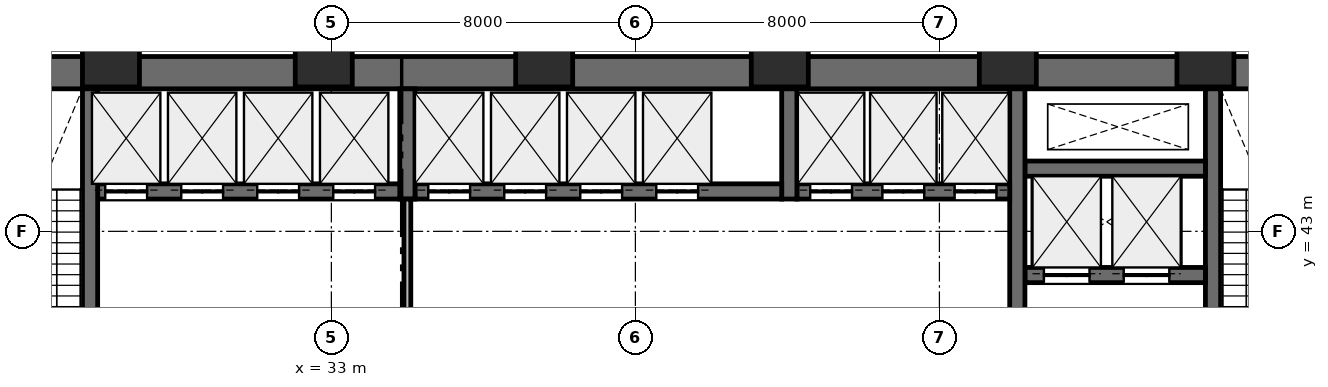
"""IFC4 building model, lengths in metres.
Left out: names, types, materials, properties, quantities, classifications, styles, units other than length and angle.
Written with IfcOpenShell. Run it as: python <this file> out.ifc"""

import sys

from ifc_helpers import new_model, si_unit, direction, frame, frame_2d, origin, origin_2d, place, context, subcontext, project, spatial, rectangle, extrude, element, fill, save


model = new_model("IFC4")
c1 = context("Model", 3, precision=1e-05, world=origin(), true_north=direction((0.0, 1.0)))
c2 = subcontext(c1, "Body", "Model", "MODEL_VIEW")
j1 = project(units=[si_unit("LENGTHUNIT", "METRE"), si_unit("PLANEANGLEUNIT", "RADIAN")], contexts=[c1])
p1 = place(None, origin())
s1 = spatial("IfcSite", under=j1, at=p1, CompositionType="ELEMENT")
p2 = place(p1, origin())
s2 = spatial("IfcBuilding", under=s1, at=p2, CompositionType="ELEMENT")
p3 = place(p2, origin())
s3 = spatial("IfcBuildingStorey", under=s2, at=p3, CompositionType="ELEMENT", Elevation=0.0)
p4 = place(p3, frame((22.9, 47.175, 0.0), z_axis=(0.0, 0.0, 1.0), x_axis=(1.0, 0.0, 0.0)))
e1 = element("IfcWall", 1, at=p4, inside=s3, PredefinedType="SHEAR", context=c2, shape_type="SweptSolid", body=[
    extrude(rectangle(XDim=43.8, YDim=0.85, at=frame_2d((21.9, 0.0))), origin(), (0.0, 0.0, 1.0), 5.4),
])
p5 = place(p3, frame((56.2, 38.425, 0.0), z_axis=(0.0, 0.0, 1.0), x_axis=(0.0, 1.0, 0.0)))
e2 = element("IfcWall", 2, at=p5, inside=s3, PredefinedType="SHEAR", context=c2, shape_type="SweptSolid", body=[
    extrude(rectangle(XDim=8.325, YDim=0.4, at=frame_2d((4.163, 0.0))), origin(), (0.0, 0.0, 1.0), 5.4),
])
p6 = place(p5, frame((0.255, 0.0, 0.0)))
e3 = element("IfcOpeningElement", 3, at=p6, cuts=e2, PredefinedType="OPENING", context=c2, shape_type="SweptSolid", body=[
    extrude(rectangle(XDim=0.9, YDim=2.15, at=frame_2d((0.45, 1.075))), frame((0.0, 0.21, 0.0), z_axis=(0.0, -1.0, 0.0), x_axis=(1.0, 0.0, 0.0)), (0.0, 0.0, 1.0), 0.42),
])
p7 = place(p3, frame((51.25, 41.85, 0.0), z_axis=(0.0, 0.0, 1.0), x_axis=(1.0, 0.0, 0.0)))
e4 = element("IfcWall", 4, at=p7, inside=s3, PredefinedType="SHEAR", context=c2, shape_type="SweptSolid", body=[
    extrude(rectangle(XDim=4.75, YDim=0.4, at=frame_2d((2.375, 0.0))), origin(), (0.0, 0.0, 1.0), 5.4),
])
p8 = place(p7, frame((0.5, 0.0, 0.0)))
e5 = element("IfcOpeningElement", 5, at=p8, cuts=e4, PredefinedType="OPENING", context=c2, shape_type="SweptSolid", body=[
    extrude(rectangle(XDim=1.2, YDim=2.2, at=frame_2d((0.6, 1.1))), frame((0.0, 0.21, 0.0), z_axis=(0.0, -1.0, 0.0), x_axis=(1.0, 0.0, 0.0)), (0.0, 0.0, 1.0), 0.42),
])
p9 = place(p7, frame((2.6, 0.0, 0.0)))
e6 = element("IfcOpeningElement", 6, at=p9, cuts=e4, PredefinedType="OPENING", context=c2, shape_type="SweptSolid", body=[
    extrude(rectangle(XDim=1.2, YDim=2.2, at=frame_2d((0.6, 1.1))), frame((0.0, 0.21, 0.0), z_axis=(0.0, -1.0, 0.0), x_axis=(1.0, 0.0, 0.0)), (0.0, 0.0, 1.0), 0.42),
])
p10 = place(p3, frame((51.25, 44.65, 0.0), z_axis=(0.0, 0.0, 1.0), x_axis=(1.0, 0.0, 0.0)))
e7 = element("IfcWall", 7, at=p10, inside=s3, PredefinedType="SHEAR", context=c2, shape_type="SweptSolid", body=[
    extrude(rectangle(XDim=4.75, YDim=0.4, at=frame_2d((2.375, 0.0))), origin(), (0.0, 0.0, 1.0), 5.4),
])
p11 = place(p3, frame((51.05, 38.425, 0.0), z_axis=(0.0, 0.0, 1.0), x_axis=(0.0, 1.0, 0.0)))
e8 = element("IfcWall", 8, at=p11, inside=s3, PredefinedType="SHEAR", context=c2, shape_type="SweptSolid", body=[
    extrude(rectangle(XDim=8.325, YDim=0.4, at=frame_2d((4.163, 0.0))), origin(), (0.0, 0.0, 1.0), 5.4),
])
p12 = place(p3, frame((45.25, 44.05, 0.0), z_axis=(0.0, 0.0, 1.0), x_axis=(1.0, 0.0, 0.0)))
e9 = element("IfcWall", 9, at=p12, inside=s3, PredefinedType="SHEAR", context=c2, shape_type="SweptSolid", body=[
    extrude(rectangle(XDim=5.6, YDim=0.4, at=frame_2d((2.8, 0.0))), origin(), (0.0, 0.0, 1.0), 5.4),
])
p13 = place(p12, frame((0.35, 0.0, 0.0)))
e10 = element("IfcOpeningElement", 10, at=p13, cuts=e9, PredefinedType="OPENING", context=c2, shape_type="SweptSolid", body=[
    extrude(rectangle(XDim=1.1, YDim=2.2, at=frame_2d((0.55, 1.1))), frame((0.0, 0.21, 0.0), z_axis=(0.0, -1.0, 0.0), x_axis=(1.0, 0.0, 0.0)), (0.0, 0.0, 1.0), 0.42),
])
p14 = place(p12, frame((2.25, 0.0, 0.0)))
e11 = element("IfcOpeningElement", 11, at=p14, cuts=e9, PredefinedType="OPENING", context=c2, shape_type="SweptSolid", body=[
    extrude(rectangle(XDim=1.1, YDim=2.2, at=frame_2d((0.55, 1.1))), frame((0.0, 0.21, 0.0), z_axis=(0.0, -1.0, 0.0), x_axis=(1.0, 0.0, 0.0)), (0.0, 0.0, 1.0), 0.42),
])
p15 = place(p12, frame((4.15, 0.0, 0.0)))
e12 = element("IfcOpeningElement", 12, at=p15, cuts=e9, PredefinedType="OPENING", context=c2, shape_type="SweptSolid", body=[
    extrude(rectangle(XDim=1.1, YDim=2.2, at=frame_2d((0.55, 1.1))), frame((0.0, 0.21, 0.0), z_axis=(0.0, -1.0, 0.0), x_axis=(1.0, 0.0, 0.0)), (0.0, 0.0, 1.0), 0.42),
])
p16 = place(p3, frame((45.05, 43.85, 0.0), z_axis=(0.0, 0.0, 1.0), x_axis=(0.0, 1.0, 0.0)))
e13 = element("IfcWall", 13, at=p16, inside=s3, PredefinedType="SHEAR", context=c2, shape_type="SweptSolid", body=[
    extrude(rectangle(XDim=2.9, YDim=0.4, at=frame_2d((1.45, 0.0))), origin(), (0.0, 0.0, 1.0), 5.4),
])
p17 = place(p3, frame((35.2, 44.05, 0.0), z_axis=(0.0, 0.0, 1.0), x_axis=(1.0, 0.0, 0.0)))
e14 = element("IfcWall", 14, at=p17, inside=s3, PredefinedType="SHEAR", context=c2, shape_type="SweptSolid", body=[
    extrude(rectangle(XDim=9.65, YDim=0.4, at=frame_2d((4.825, 0.0))), origin(), (0.0, 0.0, 1.0), 5.4),
])
p18 = place(p17, frame((0.35, 0.0, 0.0)))
e15 = element("IfcOpeningElement", 15, at=p18, cuts=e14, PredefinedType="OPENING", context=c2, shape_type="SweptSolid", body=[
    extrude(rectangle(XDim=1.1, YDim=2.2, at=frame_2d((0.55, 1.1))), frame((0.0, 0.21, 0.0), z_axis=(0.0, -1.0, 0.0), x_axis=(1.0, 0.0, 0.0)), (0.0, 0.0, 1.0), 0.42),
])
p19 = place(p17, frame((2.35, 0.0, 0.0)))
e16 = element("IfcOpeningElement", 16, at=p19, cuts=e14, PredefinedType="OPENING", context=c2, shape_type="SweptSolid", body=[
    extrude(rectangle(XDim=1.1, YDim=2.2, at=frame_2d((0.55, 1.1))), frame((0.0, 0.21, 0.0), z_axis=(0.0, -1.0, 0.0), x_axis=(1.0, 0.0, 0.0)), (0.0, 0.0, 1.0), 0.42),
])
p20 = place(p17, frame((4.35, 0.0, 0.0)))
e17 = element("IfcOpeningElement", 17, at=p20, cuts=e14, PredefinedType="OPENING", context=c2, shape_type="SweptSolid", body=[
    extrude(rectangle(XDim=1.1, YDim=2.2, at=frame_2d((0.55, 1.1))), frame((0.0, 0.21, 0.0), z_axis=(0.0, -1.0, 0.0), x_axis=(1.0, 0.0, 0.0)), (0.0, 0.0, 1.0), 0.42),
])
p21 = place(p17, frame((6.35, 0.0, 0.0)))
e18 = element("IfcOpeningElement", 18, at=p21, cuts=e14, PredefinedType="OPENING", context=c2, shape_type="SweptSolid", body=[
    extrude(rectangle(XDim=1.1, YDim=2.2, at=frame_2d((0.55, 1.1))), frame((0.0, 0.21, 0.0), z_axis=(0.0, -1.0, 0.0), x_axis=(1.0, 0.0, 0.0)), (0.0, 0.0, 1.0), 0.42),
])
p22 = place(p3, frame((35.0, 43.85, 0.0), z_axis=(0.0, 0.0, 1.0), x_axis=(0.0, 1.0, 0.0)))
e19 = element("IfcWall", 19, at=p22, inside=s3, PredefinedType="SHEAR", context=c2, shape_type="SweptSolid", body=[
    extrude(rectangle(XDim=2.9, YDim=0.4, at=frame_2d((1.45, 0.0))), origin(), (0.0, 0.0, 1.0), 5.4),
])
p23 = place(p3, frame((26.85, 44.05, 0.0), z_axis=(0.0, 0.0, 1.0), x_axis=(1.0, 0.0, 0.0)))
e20 = element("IfcWall", 20, at=p23, inside=s3, PredefinedType="SHEAR", context=c2, shape_type="SweptSolid", body=[
    extrude(rectangle(XDim=7.95, YDim=0.4, at=frame_2d((3.975, 0.0))), origin(), (0.0, 0.0, 1.0), 5.4),
])
p24 = place(p23, frame((0.2, 0.0, 0.0)))
e21 = element("IfcOpeningElement", 21, at=p24, cuts=e20, PredefinedType="OPENING", context=c2, shape_type="SweptSolid", body=[
    extrude(rectangle(XDim=1.1, YDim=2.2, at=frame_2d((0.55, 1.1))), frame((0.0, 0.21, 0.0), z_axis=(0.0, -1.0, 0.0), x_axis=(1.0, 0.0, 0.0)), (0.0, 0.0, 1.0), 0.42),
])
p25 = place(p23, frame((2.2, 0.0, 0.0)))
e22 = element("IfcOpeningElement", 22, at=p25, cuts=e20, PredefinedType="OPENING", context=c2, shape_type="SweptSolid", body=[
    extrude(rectangle(XDim=1.1, YDim=2.2, at=frame_2d((0.55, 1.1))), frame((0.0, 0.21, 0.0), z_axis=(0.0, -1.0, 0.0), x_axis=(1.0, 0.0, 0.0)), (0.0, 0.0, 1.0), 0.42),
])
p26 = place(p23, frame((4.2, 0.0, 0.0)))
e23 = element("IfcOpeningElement", 23, at=p26, cuts=e20, PredefinedType="OPENING", context=c2, shape_type="SweptSolid", body=[
    extrude(rectangle(XDim=1.1, YDim=2.2, at=frame_2d((0.55, 1.1))), frame((0.0, 0.21, 0.0), z_axis=(0.0, -1.0, 0.0), x_axis=(1.0, 0.0, 0.0)), (0.0, 0.0, 1.0), 0.42),
])
p27 = place(p23, frame((6.2, 0.0, 0.0)))
e24 = element("IfcOpeningElement", 24, at=p27, cuts=e20, PredefinedType="OPENING", context=c2, shape_type="SweptSolid", body=[
    extrude(rectangle(XDim=1.1, YDim=2.2, at=frame_2d((0.55, 1.1))), frame((0.0, 0.21, 0.0), z_axis=(0.0, -1.0, 0.0), x_axis=(1.0, 0.0, 0.0)), (0.0, 0.0, 1.0), 0.42),
])
p28 = place(p3, frame((26.65, 38.425, 0.0), z_axis=(0.0, 0.0, 1.0), x_axis=(0.0, 1.0, 0.0)))
e25 = element("IfcWall", 25, at=p28, inside=s3, PredefinedType="SHEAR", context=c2, shape_type="SweptSolid", body=[
    extrude(rectangle(XDim=8.325, YDim=0.4, at=frame_2d((4.163, 0.0))), origin(), (0.0, 0.0, 1.0), 5.4),
])
for number, where, z_axis, x_axis in (
    (26, (56.0, 47.55, 0.0), (0.0, 0.0, 1.0), (1.0, 0.0, 0.0)),
    (27, (50.8, 47.55, 0.0), (0.0, 0.0, 1.0), (1.0, 0.0, 0.0)),
    (28, (44.8, 47.55, 0.0), (0.0, 0.0, 1.0), (1.0, 0.0, 0.0)),
    (29, (38.6, 47.55, 0.0), (0.0, 0.0, 1.0), (1.0, 0.0, 0.0)),
    (30, (32.8, 47.55, 0.0), (0.0, 0.0, 1.0), (1.0, 0.0, 0.0)),
    (31, (27.2, 47.55, 0.0), (0.0, 0.0, 1.0), (1.0, 0.0, 0.0)),
):
    element("IfcColumn", number, at=place(p3, frame(where, z_axis=z_axis, x_axis=x_axis)), inside=s3, PredefinedType="COLUMN", context=c2, shape_type="SweptSolid", body=[
        extrude(rectangle(XDim=1.5, YDim=1.5, at=origin_2d()), origin(), (0.0, 0.0, 1.0), 5.4),
    ])
p29 = place(p3, frame((35.0, 38.0, 0.0), z_axis=(0.0, 0.0, 1.0), x_axis=(0.0, 1.0, 0.0)))
e32 = element("IfcWall", 32, at=p29, inside=s3, PredefinedType="STANDARD", context=c2, shape_type="SweptSolid", body=[
    extrude(rectangle(XDim=5.85, YDim=0.18, at=frame_2d((2.925, 0.0))), origin(), (0.0, 0.0, 1.0), 5.13),
])
p30 = place(p24, origin())
e33 = element("IfcDoor", 33, at=p30, inside=s3, OperationType="DOUBLE_DOOR_SLIDING", PredefinedType="DOOR", context=c2, shape_type="SweptSolid", body=[
    extrude(rectangle(XDim=1.1, YDim=2.2, at=frame_2d((0.55, 1.1))), frame((0.0, 0.025, 0.0), z_axis=(0.0, -1.0, 0.0), x_axis=(1.0, 0.0, 0.0)), (0.0, 0.0, 1.0), 0.05),
])
fill(e21, e33)
p31 = place(p25, origin())
e34 = element("IfcDoor", 34, at=p31, inside=s3, OperationType="DOUBLE_DOOR_SLIDING", PredefinedType="DOOR", context=c2, shape_type="SweptSolid", body=[
    extrude(rectangle(XDim=1.1, YDim=2.2, at=frame_2d((0.55, 1.1))), frame((0.0, 0.025, 0.0), z_axis=(0.0, -1.0, 0.0), x_axis=(1.0, 0.0, 0.0)), (0.0, 0.0, 1.0), 0.05),
])
fill(e22, e34)
p32 = place(p26, origin())
e35 = element("IfcDoor", 35, at=p32, inside=s3, OperationType="DOUBLE_DOOR_SLIDING", PredefinedType="DOOR", context=c2, shape_type="SweptSolid", body=[
    extrude(rectangle(XDim=1.1, YDim=2.2, at=frame_2d((0.55, 1.1))), frame((0.0, 0.025, 0.0), z_axis=(0.0, -1.0, 0.0), x_axis=(1.0, 0.0, 0.0)), (0.0, 0.0, 1.0), 0.05),
])
fill(e23, e35)
p33 = place(p27, origin())
e36 = element("IfcDoor", 36, at=p33, inside=s3, OperationType="DOUBLE_DOOR_SLIDING", PredefinedType="DOOR", context=c2, shape_type="SweptSolid", body=[
    extrude(rectangle(XDim=1.1, YDim=2.2, at=frame_2d((0.55, 1.1))), frame((0.0, 0.025, 0.0), z_axis=(0.0, -1.0, 0.0), x_axis=(1.0, 0.0, 0.0)), (0.0, 0.0, 1.0), 0.05),
])
fill(e24, e36)
p34 = place(p18, origin())
e37 = element("IfcDoor", 37, at=p34, inside=s3, OperationType="DOUBLE_DOOR_SLIDING", PredefinedType="DOOR", context=c2, shape_type="SweptSolid", body=[
    extrude(rectangle(XDim=1.1, YDim=2.2, at=frame_2d((0.55, 1.1))), frame((0.0, 0.025, 0.0), z_axis=(0.0, -1.0, 0.0), x_axis=(1.0, 0.0, 0.0)), (0.0, 0.0, 1.0), 0.05),
])
fill(e15, e37)
p35 = place(p19, origin())
e38 = element("IfcDoor", 38, at=p35, inside=s3, OperationType="DOUBLE_DOOR_SLIDING", PredefinedType="DOOR", context=c2, shape_type="SweptSolid", body=[
    extrude(rectangle(XDim=1.1, YDim=2.2, at=frame_2d((0.55, 1.1))), frame((0.0, 0.025, 0.0), z_axis=(0.0, -1.0, 0.0), x_axis=(1.0, 0.0, 0.0)), (0.0, 0.0, 1.0), 0.05),
])
fill(e16, e38)
p36 = place(p20, origin())
e39 = element("IfcDoor", 39, at=p36, inside=s3, OperationType="DOUBLE_DOOR_SLIDING", PredefinedType="DOOR", context=c2, shape_type="SweptSolid", body=[
    extrude(rectangle(XDim=1.1, YDim=2.2, at=frame_2d((0.55, 1.1))), frame((0.0, 0.025, 0.0), z_axis=(0.0, -1.0, 0.0), x_axis=(1.0, 0.0, 0.0)), (0.0, 0.0, 1.0), 0.05),
])
fill(e17, e39)
p37 = place(p21, origin())
e40 = element("IfcDoor", 40, at=p37, inside=s3, OperationType="DOUBLE_DOOR_SLIDING", PredefinedType="DOOR", context=c2, shape_type="SweptSolid", body=[
    extrude(rectangle(XDim=1.1, YDim=2.2, at=frame_2d((0.55, 1.1))), frame((0.0, 0.025, 0.0), z_axis=(0.0, -1.0, 0.0), x_axis=(1.0, 0.0, 0.0)), (0.0, 0.0, 1.0), 0.05),
])
fill(e18, e40)
p38 = place(p13, origin())
e41 = element("IfcDoor", 41, at=p38, inside=s3, OperationType="DOUBLE_DOOR_SLIDING", PredefinedType="DOOR", context=c2, shape_type="SweptSolid", body=[
    extrude(rectangle(XDim=1.1, YDim=2.2, at=frame_2d((0.55, 1.1))), frame((0.0, 0.025, 0.0), z_axis=(0.0, -1.0, 0.0), x_axis=(1.0, 0.0, 0.0)), (0.0, 0.0, 1.0), 0.05),
])
fill(e10, e41)
p39 = place(p14, origin())
e42 = element("IfcDoor", 42, at=p39, inside=s3, OperationType="DOUBLE_DOOR_SLIDING", PredefinedType="DOOR", context=c2, shape_type="SweptSolid", body=[
    extrude(rectangle(XDim=1.1, YDim=2.2, at=frame_2d((0.55, 1.1))), frame((0.0, 0.025, 0.0), z_axis=(0.0, -1.0, 0.0), x_axis=(1.0, 0.0, 0.0)), (0.0, 0.0, 1.0), 0.05),
])
fill(e11, e42)
p40 = place(p15, origin())
e43 = element("IfcDoor", 43, at=p40, inside=s3, OperationType="DOUBLE_DOOR_SLIDING", PredefinedType="DOOR", context=c2, shape_type="SweptSolid", body=[
    extrude(rectangle(XDim=1.1, YDim=2.2, at=frame_2d((0.55, 1.1))), frame((0.0, 0.025, 0.0), z_axis=(0.0, -1.0, 0.0), x_axis=(1.0, 0.0, 0.0)), (0.0, 0.0, 1.0), 0.05),
])
fill(e12, e43)
p41 = place(p8, origin())
e44 = element("IfcDoor", 44, at=p41, inside=s3, OperationType="DOUBLE_DOOR_SLIDING", PredefinedType="DOOR", context=c2, shape_type="SweptSolid", body=[
    extrude(rectangle(XDim=1.2, YDim=2.2, at=frame_2d((0.6, 1.1))), frame((0.0, 0.025, 0.0), z_axis=(0.0, -1.0, 0.0), x_axis=(1.0, 0.0, 0.0)), (0.0, 0.0, 1.0), 0.05),
])
fill(e5, e44)
p42 = place(p9, origin())
e45 = element("IfcDoor", 45, at=p42, inside=s3, OperationType="DOUBLE_DOOR_SLIDING", PredefinedType="DOOR", context=c2, shape_type="SweptSolid", body=[
    extrude(rectangle(XDim=1.2, YDim=2.2, at=frame_2d((0.6, 1.1))), frame((0.0, 0.025, 0.0), z_axis=(0.0, -1.0, 0.0), x_axis=(1.0, 0.0, 0.0)), (0.0, 0.0, 1.0), 0.05),
])
fill(e6, e45)
save(model, sys.argv[1])
